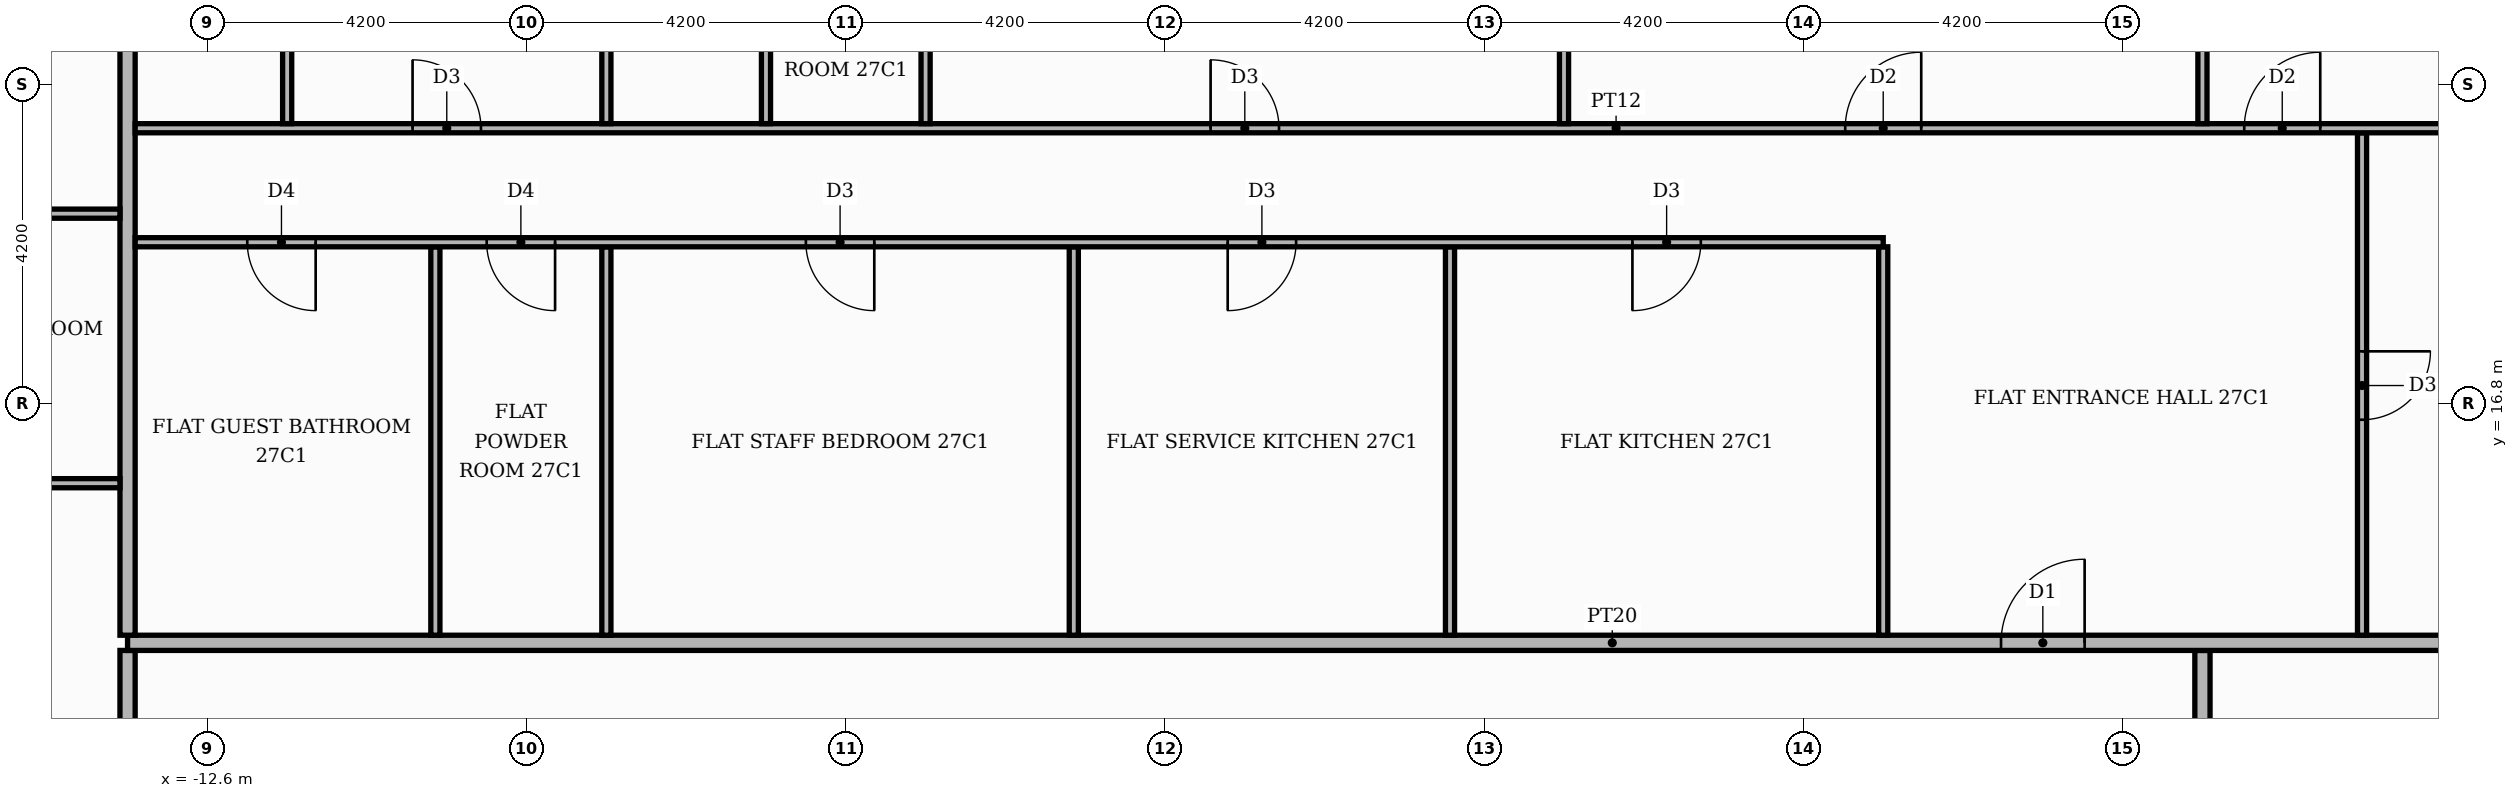
"""IFC4 building model, lengths in metres.
Left out: names, types, materials, properties, quantities, classifications, styles, units other than length and angle.
Written with IfcOpenShell. Run it as: python <this file> out.ifc"""

import sys

from ifc_helpers import new_model, si_unit, direction, frame, frame_2d, origin, place, context, subcontext, project, spatial, rectangle, extrude, element, fill, save


model = new_model("IFC4")
c1 = context("Model", 3, precision=1e-05, world=origin(), true_north=direction((0.0, 1.0)))
c2 = subcontext(c1, "Body", "Model", "MODEL_VIEW")
j1 = project(units=[si_unit("LENGTHUNIT", "METRE"), si_unit("PLANEANGLEUNIT", "RADIAN")], contexts=[c1])
p1 = place(None, origin())
s1 = spatial("IfcSite", under=j1, at=p1, CompositionType="ELEMENT")
p2 = place(p1, origin())
s2 = spatial("IfcBuilding", under=s1, at=p2, CompositionType="ELEMENT")
p3 = place(p2, frame((0.0, 0.0, 114.3)))
s3 = spatial("IfcBuildingStorey", under=s2, at=p3, CompositionType="ELEMENT", Elevation=114.3)
p4 = place(p3, frame((13.65, -13.55, 0.0), z_axis=(0.0, 0.0, 1.0), x_axis=(0.0, 1.0, 0.0)))
e1 = element("IfcWall", 1, at=p4, inside=s3, PredefinedType="PARTITIONING", context=c2, shape_type="SweptSolid", body=[
    extrude(rectangle(XDim=27.1, YDim=0.2, at=frame_2d((13.55, 0.0))), origin(), (0.0, 0.0, 1.0), 3.48),
])
p5 = place(p4, frame((1.45, 0.0, 0.0)))
e2 = element("IfcOpeningElement", 2, at=p5, cuts=e1, PredefinedType="OPENING", context=c2, shape_type="SweptSolid", body=[
    extrude(rectangle(XDim=1.1, YDim=2.4, at=frame_2d((0.55, 1.2))), frame((0.0, 0.11, 0.0), z_axis=(0.0, -1.0, 0.0), x_axis=(1.0, 0.0, 0.0)), (0.0, 0.0, 1.0), 0.22),
])
p6 = place(p3, frame((-13.65, 5.35, 0.0), z_axis=(0.0, 0.0, 1.0), x_axis=(0.0, 1.0, 0.0)))
e3 = element("IfcWall", 3, at=p6, inside=s3, PredefinedType="PARTITIONING", context=c2, shape_type="SweptSolid", body=[
    extrude(rectangle(XDim=8.2, YDim=0.2, at=frame_2d((4.1, 0.0))), origin(), (0.0, 0.0, 1.0), 3.48),
])
p7 = place(p6, frame((5.65, 0.0, 0.0)))
e4 = element("IfcOpeningElement", 4, at=p7, cuts=e3, PredefinedType="OPENING", context=c2, shape_type="SweptSolid", body=[
    extrude(rectangle(XDim=1.1, YDim=2.4, at=frame_2d((0.55, 1.2))), frame((0.0, 0.11, 0.0), z_axis=(0.0, -1.0, 0.0), x_axis=(1.0, 0.0, 0.0)), (0.0, 0.0, 1.0), 0.22),
])
p8 = place(p3, frame((-13.65, 13.65, 0.0), z_axis=(0.0, 0.0, 1.0), x_axis=(1.0, 0.0, 0.0)))
e5 = element("IfcWall", 5, at=p8, inside=s3, PredefinedType="PARTITIONING", context=c2, shape_type="SweptSolid", body=[
    extrude(rectangle(XDim=39.07, YDim=0.2, at=frame_2d((19.535, 0.0))), origin(), (0.0, 0.0, 1.0), 3.48),
])
p9 = place(p8, frame((24.65, 0.0, 0.0)))
e6 = element("IfcOpeningElement", 6, at=p9, cuts=e5, PredefinedType="OPENING", context=c2, shape_type="SweptSolid", body=[
    extrude(rectangle(XDim=1.1, YDim=2.4, at=frame_2d((0.55, 1.2))), frame((0.0, 0.11, 0.0), z_axis=(0.0, -1.0, 0.0), x_axis=(1.0, 0.0, 0.0)), (0.0, 0.0, 1.0), 0.22),
])
p10 = place(p3, frame((-13.65, 13.75, 0.0), z_axis=(0.0, 0.0, 1.0), x_axis=(0.0, 1.0, 0.0)))
e7 = element("IfcWall", 7, at=p10, inside=s3, PredefinedType="PARTITIONING", context=c2, shape_type="SweptSolid", body=[
    extrude(rectangle(XDim=11.67, YDim=0.2, at=frame_2d((5.835, 0.0))), origin(), (0.0, 0.0, 1.0), 3.48),
])
for number, where, z_axis, x_axis in (
    (8, (-9.6, 13.75, 0.0), (0.0, 0.0, 1.0), (0.0, 1.0, 0.0)),
    (9, (-7.35, 13.75, 0.0), (0.0, 0.0, 1.0), (0.0, 1.0, 0.0)),
    (10, (-1.2, 13.75, 0.0), (0.0, 0.0, 1.0), (0.0, 1.0, 0.0)),
    (11, (3.75, 13.75, 0.0), (0.0, 0.0, 1.0), (0.0, 1.0, 0.0)),
    (12, (9.45, 13.75, 0.0), (0.0, 0.0, 1.0), (0.0, 1.0, 0.0)),
):
    element("IfcWall", number, at=place(p3, frame(where, z_axis=z_axis, x_axis=x_axis)), inside=s3, PredefinedType="PARTITIONING", context=c2, shape_type="SweptSolid", body=[
        extrude(rectangle(XDim=5.11, YDim=0.12, at=frame_2d((2.555, 0.0))), origin(), (0.0, 0.0, 1.0), 3.48),
    ])
p11 = place(p3, frame((15.75, 13.75, 0.0), z_axis=(0.0, 0.0, 1.0), x_axis=(0.0, 1.0, 0.0)))
e13 = element("IfcWall", 13, at=p11, inside=s3, PredefinedType="PARTITIONING", context=c2, shape_type="SweptSolid", body=[
    extrude(rectangle(XDim=6.61, YDim=0.12, at=frame_2d((3.305, 0.0))), origin(), (0.0, 0.0, 1.0), 3.48),
])
p12 = place(p11, frame((2.835, 0.0, 0.0)))
e14 = element("IfcOpeningElement", 14, at=p12, cuts=e13, PredefinedType="OPENING", context=c2, shape_type="SweptSolid", body=[
    extrude(rectangle(XDim=0.9, YDim=2.1, at=frame_2d((0.45, 1.05))), frame((0.0, 0.07, 0.0), z_axis=(0.0, -1.0, 0.0), x_axis=(1.0, 0.0, 0.0)), (0.0, 0.0, 1.0), 0.14),
])
p13 = place(p3, frame((-19.82, 15.75, 0.0), z_axis=(0.0, 0.0, 1.0), x_axis=(1.0, 0.0, 0.0)))
e15 = element("IfcWall", 15, at=p13, inside=s3, PredefinedType="PARTITIONING", context=c2, shape_type="SweptSolid", body=[
    extrude(rectangle(XDim=6.07, YDim=0.12, at=frame_2d((3.035, 0.0))), origin(), (0.0, 0.0, 1.0), 3.48),
])
p14 = place(p13, frame((2.585, 0.0, 0.0)))
e16 = element("IfcOpeningElement", 16, at=p14, cuts=e15, PredefinedType="OPENING", context=c2, shape_type="SweptSolid", body=[
    extrude(rectangle(XDim=1.0, YDim=2.1, at=frame_2d((0.5, 1.05))), frame((0.0, 0.07, 0.0), z_axis=(0.0, -1.0, 0.0), x_axis=(1.0, 0.0, 0.0)), (0.0, 0.0, 1.0), 0.14),
])
p15 = place(p3, frame((-13.55, 18.92, 0.0), z_axis=(0.0, 0.0, 1.0), x_axis=(1.0, 0.0, 0.0)))
e17 = element("IfcWall", 17, at=p15, inside=s3, PredefinedType="PARTITIONING", context=c2, shape_type="SweptSolid", body=[
    extrude(rectangle(XDim=23.0, YDim=0.12, at=frame_2d((11.5, 0.0))), origin(), (0.0, 0.0, 1.0), 3.48),
])
p16 = place(p15, frame((19.7, 0.0, 0.0)))
e18 = element("IfcOpeningElement", 18, at=p16, cuts=e17, PredefinedType="OPENING", context=c2, shape_type="SweptSolid", body=[
    extrude(rectangle(XDim=0.9, YDim=2.1, at=frame_2d((0.45, 1.05))), frame((0.0, 0.07, 0.0), z_axis=(0.0, -1.0, 0.0), x_axis=(1.0, 0.0, 0.0)), (0.0, 0.0, 1.0), 0.14),
])
p17 = place(p15, frame((14.375, 0.0, 0.0)))
e19 = element("IfcOpeningElement", 19, at=p17, cuts=e17, PredefinedType="OPENING", context=c2, shape_type="SweptSolid", body=[
    extrude(rectangle(XDim=0.9, YDim=2.1, at=frame_2d((0.45, 1.05))), frame((0.0, 0.07, 0.0), z_axis=(0.0, -1.0, 0.0), x_axis=(1.0, 0.0, 0.0)), (0.0, 0.0, 1.0), 0.14),
])
p18 = place(p15, frame((8.825, 0.0, 0.0)))
e20 = element("IfcOpeningElement", 20, at=p18, cuts=e17, PredefinedType="OPENING", context=c2, shape_type="SweptSolid", body=[
    extrude(rectangle(XDim=0.9, YDim=2.1, at=frame_2d((0.45, 1.05))), frame((0.0, 0.07, 0.0), z_axis=(0.0, -1.0, 0.0), x_axis=(1.0, 0.0, 0.0)), (0.0, 0.0, 1.0), 0.14),
])
p19 = place(p15, frame((4.625, 0.0, 0.0)))
e21 = element("IfcOpeningElement", 21, at=p19, cuts=e17, PredefinedType="OPENING", context=c2, shape_type="SweptSolid", body=[
    extrude(rectangle(XDim=0.9, YDim=2.1, at=frame_2d((0.45, 1.05))), frame((0.0, 0.07, 0.0), z_axis=(0.0, -1.0, 0.0), x_axis=(1.0, 0.0, 0.0)), (0.0, 0.0, 1.0), 0.14),
])
p20 = place(p15, frame((1.475, 0.0, 0.0)))
e22 = element("IfcOpeningElement", 22, at=p20, cuts=e17, PredefinedType="OPENING", context=c2, shape_type="SweptSolid", body=[
    extrude(rectangle(XDim=0.9, YDim=2.1, at=frame_2d((0.45, 1.05))), frame((0.0, 0.07, 0.0), z_axis=(0.0, -1.0, 0.0), x_axis=(1.0, 0.0, 0.0)), (0.0, 0.0, 1.0), 0.14),
])
p21 = place(p3, frame((-17.4, 19.296, 0.0), z_axis=(0.0, 0.0, 1.0), x_axis=(1.0, 0.0, 0.0)))
e23 = element("IfcWall", 23, at=p21, inside=s3, PredefinedType="PARTITIONING", context=c2, shape_type="SweptSolid", body=[
    extrude(rectangle(XDim=3.65, YDim=0.12, at=frame_2d((1.825, 0.0))), origin(), (0.0, 0.0, 1.0), 3.48),
])
p22 = place(p3, frame((-13.55, 20.42, 0.0), z_axis=(0.0, 0.0, 1.0), x_axis=(1.0, 0.0, 0.0)))
e24 = element("IfcWall", 24, at=p22, inside=s3, PredefinedType="PARTITIONING", context=c2, shape_type="SweptSolid", body=[
    extrude(rectangle(XDim=38.97, YDim=0.12, at=frame_2d((19.485, 0.0))), origin(), (0.0, 0.0, 1.0), 3.48),
])
p23 = place(p22, frame((27.75, 0.0, 0.0)))
e25 = element("IfcOpeningElement", 25, at=p23, cuts=e24, PredefinedType="OPENING", context=c2, shape_type="SweptSolid", body=[
    extrude(rectangle(XDim=1.0, YDim=2.1, at=frame_2d((0.5, 1.05))), frame((0.0, 0.07, 0.0), z_axis=(0.0, -1.0, 0.0), x_axis=(1.0, 0.0, 0.0)), (0.0, 0.0, 1.0), 0.14),
])
p24 = place(p22, frame((22.5, 0.0, 0.0)))
e26 = element("IfcOpeningElement", 26, at=p24, cuts=e24, PredefinedType="OPENING", context=c2, shape_type="SweptSolid", body=[
    extrude(rectangle(XDim=1.0, YDim=2.1, at=frame_2d((0.5, 1.05))), frame((0.0, 0.07, 0.0), z_axis=(0.0, -1.0, 0.0), x_axis=(1.0, 0.0, 0.0)), (0.0, 0.0, 1.0), 0.14),
])
p25 = place(p22, frame((14.15, 0.0, 0.0)))
e27 = element("IfcOpeningElement", 27, at=p25, cuts=e24, PredefinedType="OPENING", context=c2, shape_type="SweptSolid", body=[
    extrude(rectangle(XDim=0.9, YDim=2.1, at=frame_2d((0.45, 1.05))), frame((0.0, 0.07, 0.0), z_axis=(0.0, -1.0, 0.0), x_axis=(1.0, 0.0, 0.0)), (0.0, 0.0, 1.0), 0.14),
])
p26 = place(p22, frame((3.65, 0.0, 0.0)))
e28 = element("IfcOpeningElement", 28, at=p26, cuts=e24, PredefinedType="OPENING", context=c2, shape_type="SweptSolid", body=[
    extrude(rectangle(XDim=0.9, YDim=2.1, at=frame_2d((0.45, 1.05))), frame((0.0, 0.07, 0.0), z_axis=(0.0, -1.0, 0.0), x_axis=(1.0, 0.0, 0.0)), (0.0, 0.0, 1.0), 0.14),
])
p27 = place(p3, frame((-11.55, 20.48, 0.0), z_axis=(0.0, 0.0, 1.0), x_axis=(0.0, 1.0, 0.0)))
e29 = element("IfcWall", 29, at=p27, inside=s3, PredefinedType="PARTITIONING", context=c2, shape_type="SweptSolid", body=[
    extrude(rectangle(XDim=4.94, YDim=0.12, at=frame_2d((2.47, 0.0))), origin(), (0.0, 0.0, 1.0), 3.48),
])
p28 = place(p27, frame((2.14, 0.0, 0.0)))
e30 = element("IfcOpeningElement", 30, at=p28, cuts=e29, PredefinedType="OPENING", context=c2, shape_type="SweptSolid", body=[
    extrude(rectangle(XDim=0.9, YDim=2.1, at=frame_2d((0.45, 1.05))), frame((0.0, 0.07, 0.0), z_axis=(0.0, -1.0, 0.0), x_axis=(1.0, 0.0, 0.0)), (0.0, 0.0, 1.0), 0.14),
])
p29 = place(p3, frame((-7.35, 20.48, 0.0), z_axis=(0.0, 0.0, 1.0), x_axis=(0.0, 1.0, 0.0)))
e31 = element("IfcWall", 31, at=p29, inside=s3, PredefinedType="PARTITIONING", context=c2, shape_type="SweptSolid", body=[
    extrude(rectangle(XDim=4.94, YDim=0.12, at=frame_2d((2.47, 0.0))), origin(), (0.0, 0.0, 1.0), 3.48),
])
p30 = place(p3, frame((-5.25, 20.48, 0.0), z_axis=(0.0, 0.0, 1.0), x_axis=(0.0, 1.0, 0.0)))
e32 = element("IfcWall", 32, at=p30, inside=s3, PredefinedType="PARTITIONING", context=c2, shape_type="SweptSolid", body=[
    extrude(rectangle(XDim=4.94, YDim=0.12, at=frame_2d((2.47, 0.0))), origin(), (0.0, 0.0, 1.0), 3.48),
])
p31 = place(p30, frame((2.14, 0.0, 0.0)))
e33 = element("IfcOpeningElement", 33, at=p31, cuts=e32, PredefinedType="OPENING", context=c2, shape_type="SweptSolid", body=[
    extrude(rectangle(XDim=0.9, YDim=2.1, at=frame_2d((0.45, 1.05))), frame((0.0, 0.07, 0.0), z_axis=(0.0, -1.0, 0.0), x_axis=(1.0, 0.0, 0.0)), (0.0, 0.0, 1.0), 0.14),
])
p32 = place(p3, frame((-3.15, 20.48, 0.0), z_axis=(0.0, 0.0, 1.0), x_axis=(0.0, 1.0, 0.0)))
e34 = element("IfcWall", 34, at=p32, inside=s3, PredefinedType="PARTITIONING", context=c2, shape_type="SweptSolid", body=[
    extrude(rectangle(XDim=4.94, YDim=0.12, at=frame_2d((2.47, 0.0))), origin(), (0.0, 0.0, 1.0), 3.48),
])
p33 = place(p32, frame((2.14, 0.0, 0.0)))
e35 = element("IfcOpeningElement", 35, at=p33, cuts=e34, PredefinedType="OPENING", context=c2, shape_type="SweptSolid", body=[
    extrude(rectangle(XDim=0.9, YDim=2.1, at=frame_2d((0.45, 1.05))), frame((0.0, 0.07, 0.0), z_axis=(0.0, -1.0, 0.0), x_axis=(1.0, 0.0, 0.0)), (0.0, 0.0, 1.0), 0.14),
])
for number, where, z_axis, x_axis in (
    (36, (5.25, 20.48, 0.0), (0.0, 0.0, 1.0), (0.0, 1.0, 0.0)),
    (37, (13.65, 20.48, 0.0), (0.0, 0.0, 1.0), (0.0, 1.0, 0.0)),
):
    element("IfcWall", number, at=place(p3, frame(where, z_axis=z_axis, x_axis=x_axis)), inside=s3, PredefinedType="PARTITIONING", context=c2, shape_type="SweptSolid", body=[
        extrude(rectangle(XDim=4.94, YDim=0.12, at=frame_2d((2.47, 0.0))), origin(), (0.0, 0.0, 1.0), 3.48),
    ])
p34 = place(p9, origin())
e38 = element("IfcDoor", 38, at=p34, inside=s3, OperationType="SINGLE_SWING_RIGHT", PredefinedType="DOOR", context=c2, shape_type="SweptSolid", body=[
    extrude(rectangle(XDim=1.1, YDim=2.4, at=frame_2d((0.55, 1.2))), frame((0.0, 0.025, 0.0), z_axis=(0.0, -1.0, 0.0), x_axis=(1.0, 0.0, 0.0)), (0.0, 0.0, 1.0), 0.05),
])
fill(e6, e38)
p35 = place(p12, frame((0.9, 0.0, 0.0), z_axis=(0.0, 0.0, 1.0), x_axis=(-1.0, 0.0, 0.0)))
e39 = element("IfcDoor", 39, at=p35, inside=s3, OperationType="SINGLE_SWING_RIGHT", PredefinedType="DOOR", context=c2, shape_type="SweptSolid", body=[
    extrude(rectangle(XDim=0.9, YDim=2.1, at=frame_2d((0.45, 1.05))), frame((0.0, 0.025, 0.0), z_axis=(0.0, -1.0, 0.0), x_axis=(1.0, 0.0, 0.0)), (0.0, 0.0, 1.0), 0.05),
])
fill(e14, e39)
p36 = place(p16, frame((0.9, 0.0, 0.0), z_axis=(0.0, 0.0, 1.0), x_axis=(-1.0, 0.0, 0.0)))
e40 = element("IfcDoor", 40, at=p36, inside=s3, OperationType="SINGLE_SWING_LEFT", PredefinedType="DOOR", context=c2, shape_type="SweptSolid", body=[
    extrude(rectangle(XDim=0.9, YDim=2.1, at=frame_2d((0.45, 1.05))), frame((0.0, 0.025, 0.0), z_axis=(0.0, -1.0, 0.0), x_axis=(1.0, 0.0, 0.0)), (0.0, 0.0, 1.0), 0.05),
])
fill(e18, e40)
p37 = place(p17, frame((0.9, 0.0, 0.0), z_axis=(0.0, 0.0, 1.0), x_axis=(-1.0, 0.0, 0.0)))
e41 = element("IfcDoor", 41, at=p37, inside=s3, OperationType="SINGLE_SWING_LEFT", PredefinedType="DOOR", context=c2, shape_type="SweptSolid", body=[
    extrude(rectangle(XDim=0.9, YDim=2.1, at=frame_2d((0.45, 1.05))), frame((0.0, 0.025, 0.0), z_axis=(0.0, -1.0, 0.0), x_axis=(1.0, 0.0, 0.0)), (0.0, 0.0, 1.0), 0.05),
])
fill(e19, e41)
p38 = place(p18, frame((0.9, 0.0, 0.0), z_axis=(0.0, 0.0, 1.0), x_axis=(-1.0, 0.0, 0.0)))
e42 = element("IfcDoor", 42, at=p38, inside=s3, OperationType="SINGLE_SWING_RIGHT", PredefinedType="DOOR", context=c2, shape_type="SweptSolid", body=[
    extrude(rectangle(XDim=0.9, YDim=2.1, at=frame_2d((0.45, 1.05))), frame((0.0, 0.025, 0.0), z_axis=(0.0, -1.0, 0.0), x_axis=(1.0, 0.0, 0.0)), (0.0, 0.0, 1.0), 0.05),
])
fill(e20, e42)
p39 = place(p19, frame((0.9, 0.0, 0.0), z_axis=(0.0, 0.0, 1.0), x_axis=(-1.0, 0.0, 0.0)))
e43 = element("IfcDoor", 43, at=p39, inside=s3, OperationType="SINGLE_SWING_RIGHT", PredefinedType="DOOR", context=c2, shape_type="SweptSolid", body=[
    extrude(rectangle(XDim=0.9, YDim=2.1, at=frame_2d((0.45, 1.05))), frame((0.0, 0.025, 0.0), z_axis=(0.0, -1.0, 0.0), x_axis=(1.0, 0.0, 0.0)), (0.0, 0.0, 1.0), 0.05),
])
fill(e21, e43)
p40 = place(p20, frame((0.9, 0.0, 0.0), z_axis=(0.0, 0.0, 1.0), x_axis=(-1.0, 0.0, 0.0)))
e44 = element("IfcDoor", 44, at=p40, inside=s3, OperationType="SINGLE_SWING_RIGHT", PredefinedType="DOOR", context=c2, shape_type="SweptSolid", body=[
    extrude(rectangle(XDim=0.9, YDim=2.1, at=frame_2d((0.45, 1.05))), frame((0.0, 0.025, 0.0), z_axis=(0.0, -1.0, 0.0), x_axis=(1.0, 0.0, 0.0)), (0.0, 0.0, 1.0), 0.05),
])
fill(e22, e44)
p41 = place(p23, origin())
e45 = element("IfcDoor", 45, at=p41, inside=s3, OperationType="SINGLE_SWING_RIGHT", PredefinedType="DOOR", context=c2, shape_type="SweptSolid", body=[
    extrude(rectangle(XDim=1.0, YDim=2.1, at=frame_2d((0.5, 1.05))), frame((0.0, 0.025, 0.0), z_axis=(0.0, -1.0, 0.0), x_axis=(1.0, 0.0, 0.0)), (0.0, 0.0, 1.0), 0.05),
])
fill(e25, e45)
p42 = place(p24, origin())
e46 = element("IfcDoor", 46, at=p42, inside=s3, OperationType="SINGLE_SWING_RIGHT", PredefinedType="DOOR", context=c2, shape_type="SweptSolid", body=[
    extrude(rectangle(XDim=1.0, YDim=2.1, at=frame_2d((0.5, 1.05))), frame((0.0, 0.025, 0.0), z_axis=(0.0, -1.0, 0.0), x_axis=(1.0, 0.0, 0.0)), (0.0, 0.0, 1.0), 0.05),
])
fill(e26, e46)
p43 = place(p25, origin())
e47 = element("IfcDoor", 47, at=p43, inside=s3, OperationType="SINGLE_SWING_LEFT", PredefinedType="DOOR", context=c2, shape_type="SweptSolid", body=[
    extrude(rectangle(XDim=0.9, YDim=2.1, at=frame_2d((0.45, 1.05))), frame((0.0, 0.025, 0.0), z_axis=(0.0, -1.0, 0.0), x_axis=(1.0, 0.0, 0.0)), (0.0, 0.0, 1.0), 0.05),
])
fill(e27, e47)
p44 = place(p26, origin())
e48 = element("IfcDoor", 48, at=p44, inside=s3, OperationType="SINGLE_SWING_LEFT", PredefinedType="DOOR", context=c2, shape_type="SweptSolid", body=[
    extrude(rectangle(XDim=0.9, YDim=2.1, at=frame_2d((0.45, 1.05))), frame((0.0, 0.025, 0.0), z_axis=(0.0, -1.0, 0.0), x_axis=(1.0, 0.0, 0.0)), (0.0, 0.0, 1.0), 0.05),
])
fill(e28, e48)
save(model, sys.argv[1])
